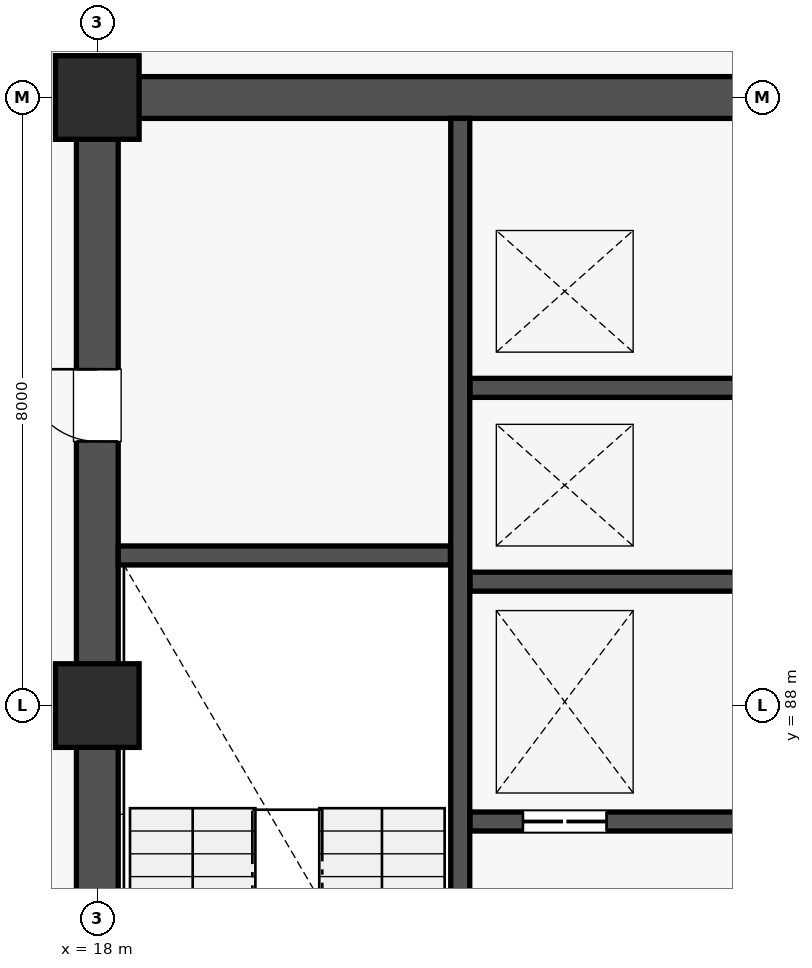
"""IFC4 building model, lengths in metres.
Left out: names, types, materials, properties, quantities, classifications, styles, units other than length and angle.
Written with IfcOpenShell. Run it as: python <this file> out.ifc"""

import sys

from ifc_helpers import new_model, si_unit, direction, frame, frame_2d, origin, origin_2d, place, context, subcontext, project, spatial, rectangle, extrude, element, fill, save


model = new_model("IFC4")
c1 = context("Model", 3, precision=1e-05, world=origin(), true_north=direction((0.0, 1.0)))
c2 = subcontext(c1, "Body", "Model", "MODEL_VIEW")
j1 = project(units=[si_unit("LENGTHUNIT", "METRE"), si_unit("PLANEANGLEUNIT", "RADIAN")], contexts=[c1])
p1 = place(None, origin())
s1 = spatial("IfcSite", under=j1, at=p1, CompositionType="ELEMENT")
p2 = place(p1, origin())
s2 = spatial("IfcBuilding", under=s1, at=p2, CompositionType="ELEMENT")
p3 = place(p2, origin())
s3 = spatial("IfcBuildingStorey", under=s2, at=p3, CompositionType="ELEMENT", Elevation=0.0)
for number, where, z_axis, x_axis in (
    (1, (18.0, 88.0, 0.0), (0.0, 0.0, 1.0), (1.0, 0.0, 0.0)),
    (2, (18.0, 96.0, 0.0), (0.0, 0.0, 1.0), (1.0, 0.0, 0.0)),
):
    element("IfcColumn", number, at=place(p3, frame(where, z_axis=z_axis, x_axis=x_axis)), inside=s3, PredefinedType="COLUMN", context=c2, shape_type="SweptSolid", body=[
        extrude(rectangle(XDim=1.1, YDim=1.1, at=origin_2d()), origin(), (0.0, 0.0, 1.0), 4.5),
    ])
p4 = place(p3, frame((18.275, 96.0, 0.0), z_axis=(0.0, 0.0, 1.0), x_axis=(1.0, 0.0, 0.0)))
e3 = element("IfcWall", 3, at=p4, inside=s3, PredefinedType="SHEAR", context=c2, shape_type="SweptSolid", body=[
    extrude(rectangle(XDim=8.45, YDim=0.55, at=frame_2d((4.225, 0.0))), origin(), (0.0, 0.0, 1.0), 3.3),
])
p5 = place(p3, frame((18.0, 80.275, 0.0), z_axis=(0.0, 0.0, 1.0), x_axis=(0.0, 1.0, 0.0)))
e4 = element("IfcWall", 4, at=p5, inside=s3, PredefinedType="SHEAR", context=c2, shape_type="SweptSolid", body=[
    extrude(rectangle(XDim=15.45, YDim=0.55, at=frame_2d((7.725, 0.0))), origin(), (0.0, 0.0, 1.0), 3.3),
])
p6 = place(p5, frame((11.2, 0.0, 0.0)))
e5 = element("IfcOpeningElement", 5, at=p6, cuts=e4, PredefinedType="OPENING", context=c2, shape_type="SweptSolid", body=[
    extrude(rectangle(XDim=0.95, YDim=2.1, at=frame_2d((0.475, 1.05))), frame((0.0, 0.287, 0.0), z_axis=(0.0, -1.0, 0.0), x_axis=(1.0, 0.0, 0.0)), (0.0, 0.0, 1.0), 0.574),
])
p7 = place(p3, frame((22.775, 80.275, 0.0), z_axis=(0.0, 0.0, 1.0), x_axis=(0.0, 1.0, 0.0)))
e6 = element("IfcWall", 6, at=p7, inside=s3, PredefinedType="SOLIDWALL", context=c2, shape_type="SweptSolid", body=[
    extrude(rectangle(XDim=15.45, YDim=0.25, at=frame_2d((7.725, 0.0))), origin(), (0.0, 0.0, 1.0), 3.3),
])
p8 = place(p7, frame((0.45, 0.0, 0.0)))
e7 = element("IfcOpeningElement", 7, at=p8, cuts=e6, PredefinedType="OPENING", context=c2, shape_type="SweptSolid", body=[
    extrude(rectangle(XDim=1.1, YDim=2.15, at=frame_2d((0.55, 1.075))), frame((0.0, 0.137, 0.0), z_axis=(0.0, -1.0, 0.0), x_axis=(1.0, 0.0, 0.0)), (0.0, 0.0, 1.0), 0.274),
])
p9 = place(p3, frame((18.275, 89.975, 0.0), z_axis=(0.0, 0.0, 1.0), x_axis=(1.0, 0.0, 0.0)))
e8 = element("IfcWall", 8, at=p9, inside=s3, PredefinedType="SOLIDWALL", context=c2, shape_type="SweptSolid", body=[
    extrude(rectangle(XDim=4.37, YDim=0.25, at=frame_2d((2.185, 0.0))), origin(), (0.0, 0.0, 1.0), 3.3),
])
p10 = place(p3, frame((22.905, 86.475, 0.0), z_axis=(0.0, 0.0, 1.0), x_axis=(1.0, 0.0, 0.0)))
e9 = element("IfcWall", 9, at=p10, inside=s3, PredefinedType="SOLIDWALL", context=c2, shape_type="SweptSolid", body=[
    extrude(rectangle(XDim=3.82, YDim=0.25, at=frame_2d((1.91, 0.0))), origin(), (0.0, 0.0, 1.0), 3.3),
])
p11 = place(p10, frame((0.695, 0.0, 0.0)))
e10 = element("IfcOpeningElement", 10, at=p11, cuts=e9, PredefinedType="OPENING", context=c2, shape_type="SweptSolid", body=[
    extrude(rectangle(XDim=1.1, YDim=2.12, at=frame_2d((0.55, 1.06))), frame((0.0, 0.137, 0.0), z_axis=(0.0, -1.0, 0.0), x_axis=(1.0, 0.0, 0.0)), (0.0, 0.0, 1.0), 0.274),
])
for number, where, z_axis, x_axis in (
    (11, (22.905, 89.63, 0.0), (0.0, 0.0, 1.0), (1.0, 0.0, 0.0)),
    (12, (22.905, 92.18, 0.0), (0.0, 0.0, 1.0), (1.0, 0.0, 0.0)),
):
    element("IfcWall", number, at=place(p3, frame(where, z_axis=z_axis, x_axis=x_axis)), inside=s3, PredefinedType="SOLIDWALL", context=c2, shape_type="SweptSolid", body=[
        extrude(rectangle(XDim=3.82, YDim=0.25, at=frame_2d((1.91, 0.0))), origin(), (0.0, 0.0, 1.0), 3.3),
    ])
p12 = place(p6, origin())
e13 = element("IfcDoor", 13, at=p12, inside=s3, OperationType="SINGLE_SWING_RIGHT", PredefinedType="DOOR", context=c2, shape_type="SweptSolid", body=[
    extrude(rectangle(XDim=0.95, YDim=2.1, at=frame_2d((0.475, 1.05))), frame((0.0, 0.025, 0.0), z_axis=(0.0, -1.0, 0.0), x_axis=(1.0, 0.0, 0.0)), (0.0, 0.0, 1.0), 0.05),
])
fill(e5, e13)
p13 = place(p11, origin())
e14 = element("IfcDoor", 14, at=p13, inside=s3, OperationType="DOUBLE_DOOR_SLIDING", PredefinedType="DOOR", context=c2, shape_type="SweptSolid", body=[
    extrude(rectangle(XDim=1.1, YDim=2.12, at=frame_2d((0.55, 1.06))), frame((0.0, 0.025, 0.0), z_axis=(0.0, -1.0, 0.0), x_axis=(1.0, 0.0, 0.0)), (0.0, 0.0, 1.0), 0.05),
])
fill(e10, e14)
save(model, sys.argv[1])
